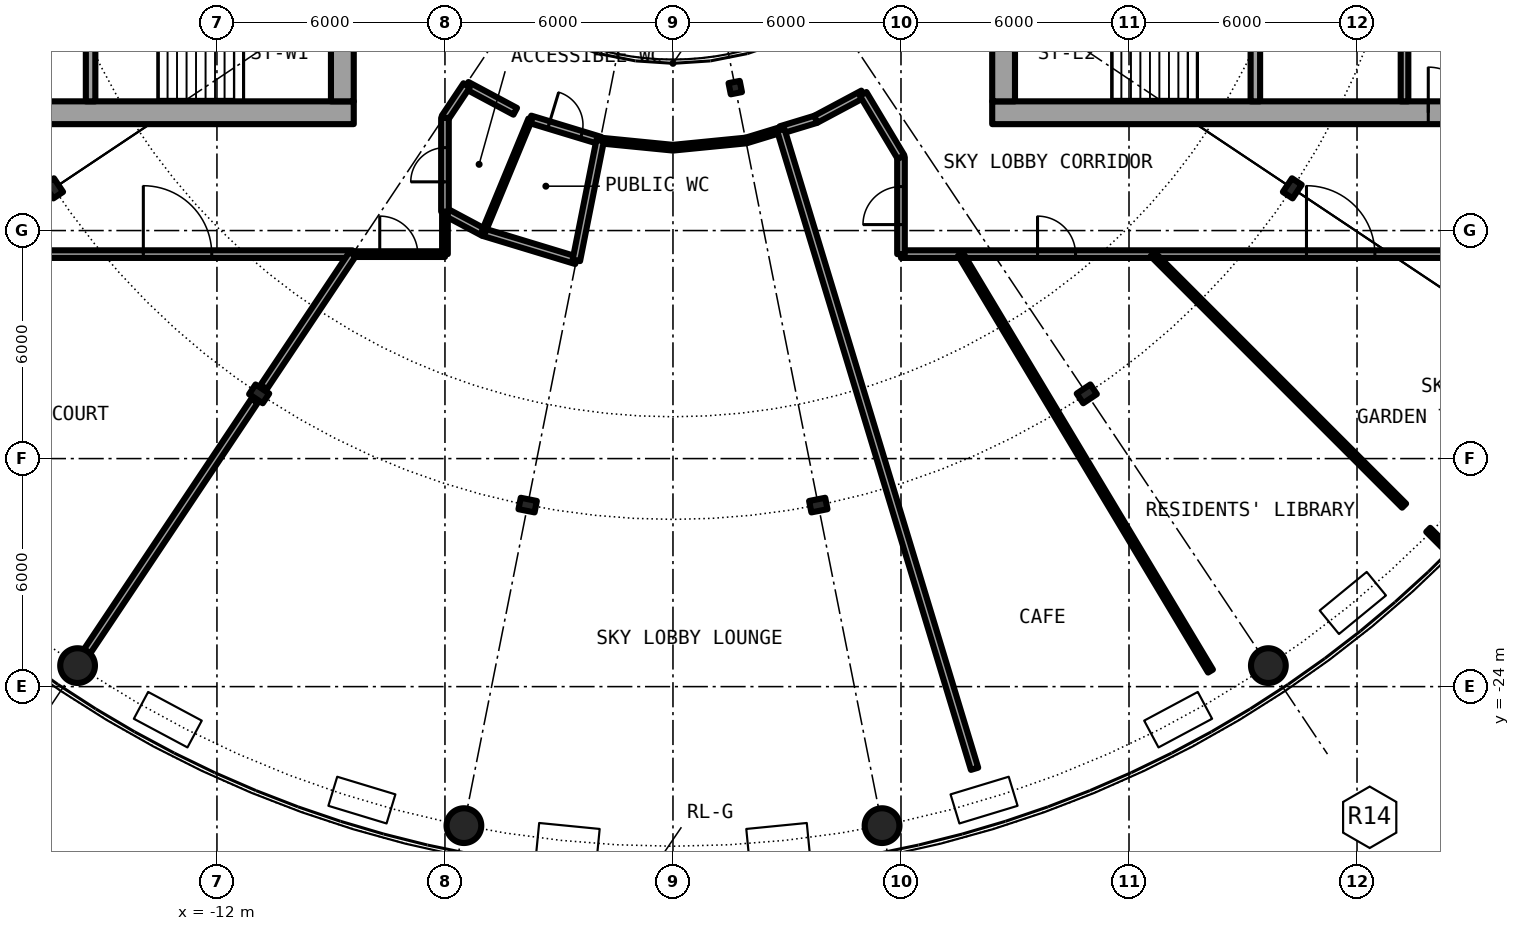
"""IFC4 building model, lengths in metres.
Left out: names, types, materials, properties, quantities, classifications, styles, units other than length and angle.
Written with IfcOpenShell. Run it as: python <this file> out.ifc"""

import sys

from ifc_helpers import new_model, si_unit, direction, frame, frame_2d, origin, origin_2d, place, context, subcontext, project, spatial, rectangle, hollow_circle, i_section, extrude, element, fill, save


model = new_model("IFC4")
c1 = context("Model", 3, precision=1e-05, world=origin(), true_north=direction((0.0, 1.0)))
c2 = subcontext(c1, "Body", "Model", "MODEL_VIEW")
j1 = project(units=[si_unit("LENGTHUNIT", "METRE"), si_unit("PLANEANGLEUNIT", "RADIAN")], contexts=[c1])
p1 = place(None, origin())
s1 = spatial("IfcSite", under=j1, at=p1, CompositionType="ELEMENT")
p2 = place(p1, origin())
s2 = spatial("IfcBuilding", under=s1, at=p2, CompositionType="ELEMENT")
p3 = place(p2, frame((0.0, 0.0, 139.1)))
s3 = spatial("IfcBuildingStorey", under=s2, at=p3, CompositionType="ELEMENT", Elevation=139.1)
for number, where, z_axis, x_axis in (
    (1, (-15.667, -23.448, 0.0), (0.0, 0.0, 1.0), (1.0, 0.0, 0.0)),
    (2, (-5.501, -27.658, 0.0), (0.0, 0.0, 1.0), (1.0, 0.0, 0.0)),
    (3, (5.501, -27.658, 0.0), (0.0, 0.0, 1.0), (1.0, 0.0, 0.0)),
    (4, (15.667, -23.448, 0.0), (0.0, 0.0, 1.0), (1.0, 0.0, 0.0)),
):
    element("IfcColumn", number, at=place(p3, frame(where, z_axis=z_axis, x_axis=x_axis)), inside=s3, PredefinedType="COLUMN", context=c2, shape_type="SweptSolid", body=[
        extrude(hollow_circle(Radius=0.457, WallThickness=0.04, at=origin_2d()), origin(), (0.0, 0.0, 1.0), 6.1),
    ])
for number, where, z_axis, x_axis in (
    (5, (-16.297, -10.889, 0.0), (0.0, 0.0, 1.0), (-0.831, -0.556, 0.0)),
    (6, (-10.889, -16.297, 0.0), (0.0, 0.0, 1.0), (-0.556, -0.831, 0.0)),
    (7, (-3.824, -19.223, 0.0), (0.0, 0.0, 1.0), (-0.195, -0.981, 0.0)),
    (8, (3.824, -19.223, 0.0), (0.0, 0.0, 1.0), (0.195, -0.981, 0.0)),
    (9, (10.889, -16.297, 0.0), (0.0, 0.0, 1.0), (0.556, -0.831, 0.0)),
    (10, (16.297, -10.889, 0.0), (0.0, 0.0, 1.0), (0.831, -0.556, 0.0)),
):
    element("IfcColumn", number, at=place(p3, frame(where, z_axis=z_axis, x_axis=x_axis)), inside=s3, PredefinedType="COLUMN", context=c2, shape_type="SweptSolid", body=[
        extrude(i_section(OverallWidth=0.307, OverallDepth=0.432, WebThickness=0.021, FlangeThickness=0.04, FilletRadius=0.027, at=origin_2d()), origin(), (0.0, 0.0, 1.0), 6.1),
    ])
p4 = place(p3, frame((1.639, -8.239, 0.0), z_axis=(0.0, 0.0, 1.0), x_axis=(0.195090322016, -0.980785280403, 0.0)))
e11 = element("IfcColumn", 11, at=p4, inside=s3, PredefinedType="COLUMN", context=c2, shape_type="SweptSolid", body=[
    extrude(i_section(OverallWidth=0.3, OverallDepth=0.3, WebThickness=0.011, FlangeThickness=0.019, FilletRadius=0.027, at=origin_2d()), origin(), (0.0, 0.0, 1.0), 6.1),
])
p5 = place(p3, frame((8.4, -8.9, 0.0), z_axis=(0.0, 0.0, 1.0), x_axis=(1.0, 0.0, 0.0)))
e12 = element("IfcWall", 12, at=p5, inside=s3, PredefinedType="SHEAR", context=c2, shape_type="SweptSolid", body=[
    extrude(rectangle(XDim=13.8, YDim=0.6, at=frame_2d((6.9, 0.0))), origin(), (0.0, 0.0, 1.0), 6.1),
])
p6 = place(p5, frame((11.475, 0.0, 0.0)))
e13 = element("IfcOpeningElement", 13, at=p6, cuts=e12, PredefinedType="OPENING", context=c2, shape_type="SweptSolid", body=[
    extrude(rectangle(XDim=1.2, YDim=2.3, at=frame_2d((0.6, 1.15))), frame((0.0, 0.31, 0.0), z_axis=(0.0, -1.0, 0.0), x_axis=(1.0, 0.0, 0.0)), (0.0, 0.0, 1.0), 0.62),
])
p7 = place(p3, frame((8.7, -8.6, 0.0), z_axis=(0.0, 0.0, 1.0), x_axis=(0.0, 1.0, 0.0)))
e14 = element("IfcWall", 14, at=p7, inside=s3, PredefinedType="SHEAR", context=c2, shape_type="SweptSolid", body=[
    extrude(rectangle(XDim=17.2, YDim=0.6, at=frame_2d((8.6, 0.0))), origin(), (0.0, 0.0, 1.0), 6.1),
])
p8 = place(p7, frame((7.4, 0.0, 0.1)))
e15 = element("IfcOpeningElement", 15, at=p8, cuts=e14, PredefinedType="OPENING", context=c2, shape_type="SweptSolid", body=[
    extrude(rectangle(XDim=2.4, YDim=2.2, at=frame_2d((1.2, 1.1))), frame((0.0, 0.31, 0.0), z_axis=(0.0, -1.0, 0.0), x_axis=(1.0, 0.0, 0.0)), (0.0, 0.0, 1.0), 0.62),
])
p9 = place(p3, frame((15.325, -8.6, 0.0), z_axis=(0.0, 0.0, 1.0), x_axis=(0.0, 1.0, 0.0)))
e16 = element("IfcWall", 16, at=p9, inside=s3, PredefinedType="SHEAR", context=c2, shape_type="SweptSolid", body=[
    extrude(rectangle(XDim=3.95, YDim=0.25, at=frame_2d((1.975, 0.0))), origin(), (0.0, 0.0, 1.0), 6.1),
])
p10 = place(p9, frame((2.025, 0.0, 0.0)))
e17 = element("IfcOpeningElement", 17, at=p10, cuts=e16, PredefinedType="OPENING", context=c2, shape_type="SweptSolid", body=[
    extrude(rectangle(XDim=1.2, YDim=2.3, at=frame_2d((0.6, 1.15))), frame((0.0, 0.135, 0.0), z_axis=(0.0, -1.0, 0.0), x_axis=(1.0, 0.0, 0.0)), (0.0, 0.0, 1.0), 0.27),
])
p11 = place(p3, frame((19.25, -8.6, 0.0), z_axis=(0.0, 0.0, 1.0), x_axis=(0.0, 1.0, 0.0)))
e18 = element("IfcWall", 18, at=p11, inside=s3, PredefinedType="SOLIDWALL", context=c2, shape_type="SweptSolid", body=[
    extrude(rectangle(XDim=7.025, YDim=0.2, at=frame_2d((3.513, 0.0))), origin(), (0.0, 0.0, 1.0), 5.75),
])
p12 = place(p11, frame((2.35, 0.0, 0.0)))
e19 = element("IfcOpeningElement", 19, at=p12, cuts=e18, PredefinedType="OPENING", context=c2, shape_type="SweptSolid", body=[
    extrude(rectangle(XDim=1.1, YDim=2.3, at=frame_2d((0.55, 1.15))), frame((0.0, 0.11, 0.0), z_axis=(0.0, -1.0, 0.0), x_axis=(1.0, 0.0, 0.0)), (0.0, 0.0, 1.0), 0.22),
])
p13 = place(p3, frame((-22.2, -8.9, 0.0), z_axis=(0.0, 0.0, 1.0), x_axis=(1.0, 0.0, 0.0)))
e20 = element("IfcWall", 20, at=p13, inside=s3, PredefinedType="SHEAR", context=c2, shape_type="SweptSolid", body=[
    extrude(rectangle(XDim=13.8, YDim=0.6, at=frame_2d((6.9, 0.0))), origin(), (0.0, 0.0, 1.0), 6.1),
])
p14 = place(p13, frame((1.125, 0.0, 0.0)))
e21 = element("IfcOpeningElement", 21, at=p14, cuts=e20, PredefinedType="OPENING", context=c2, shape_type="SweptSolid", body=[
    extrude(rectangle(XDim=1.2, YDim=2.3, at=frame_2d((0.6, 1.15))), frame((0.0, 0.31, 0.0), z_axis=(0.0, -1.0, 0.0), x_axis=(1.0, 0.0, 0.0)), (0.0, 0.0, 1.0), 0.62),
])
p15 = place(p3, frame((-8.7, 8.6, 0.0), z_axis=(0.0, 0.0, 1.0), x_axis=(0.0, -1.0, 0.0)))
e22 = element("IfcWall", 22, at=p15, inside=s3, PredefinedType="SHEAR", context=c2, shape_type="SweptSolid", body=[
    extrude(rectangle(XDim=17.2, YDim=0.6, at=frame_2d((8.6, 0.0))), origin(), (0.0, 0.0, 1.0), 6.1),
])
p16 = place(p15, frame((7.4, 0.0, 0.1)))
e23 = element("IfcOpeningElement", 23, at=p16, cuts=e22, PredefinedType="OPENING", context=c2, shape_type="SweptSolid", body=[
    extrude(rectangle(XDim=2.4, YDim=2.2, at=frame_2d((1.2, 1.1))), frame((0.0, 0.31, 0.0), z_axis=(0.0, -1.0, 0.0), x_axis=(1.0, 0.0, 0.0)), (0.0, 0.0, 1.0), 0.62),
])
p17 = place(p3, frame((-15.325, -4.65, 0.0), z_axis=(0.0, 0.0, 1.0), x_axis=(0.0, -1.0, 0.0)))
e24 = element("IfcWall", 24, at=p17, inside=s3, PredefinedType="SHEAR", context=c2, shape_type="SweptSolid", body=[
    extrude(rectangle(XDim=3.95, YDim=0.25, at=frame_2d((1.975, 0.0))), origin(), (0.0, 0.0, 1.0), 6.1),
])
p18 = place(p17, frame((1.375, 0.0, 0.0)))
e25 = element("IfcOpeningElement", 25, at=p18, cuts=e24, PredefinedType="OPENING", context=c2, shape_type="SweptSolid", body=[
    extrude(rectangle(XDim=1.2, YDim=2.3, at=frame_2d((0.6, 1.15))), frame((0.0, 0.135, 0.0), z_axis=(0.0, -1.0, 0.0), x_axis=(1.0, 0.0, 0.0)), (0.0, 0.0, 1.0), 0.27),
])
p19 = place(p3, frame((-6.0, -11.503, 0.0), z_axis=(0.0, 0.0, 1.0), x_axis=(0.882235076446, -0.470809165042, 0.0)))
e26 = element("IfcWall", 26, at=p19, inside=s3, PredefinedType="PARTITIONING", context=c2, shape_type="SweptSolid", body=[
    extrude(rectangle(XDim=1.147, YDim=0.2, at=frame_2d((0.573, 0.0))), origin(), (0.0, 0.0, 1.0), 5.75),
])
p20 = place(p3, frame((-4.988, -12.043, 0.0), z_axis=(0.0, 0.0, 1.0), x_axis=(0.956914242202, -0.290370682182, 0.0)))
e27 = element("IfcWall", 27, at=p20, inside=s3, PredefinedType="PARTITIONING", context=c2, shape_type="SweptSolid", body=[
    extrude(rectangle(XDim=2.555, YDim=0.2, at=frame_2d((1.278, 0.0))), origin(), (0.0, 0.0, 1.0), 5.75),
])
p21 = place(p3, frame((-21.9, -12.62, 0.0), z_axis=(0.0, 0.0, 1.0), x_axis=(1.0, 0.0, 0.0)))
e28 = element("IfcWall", 28, at=p21, inside=s3, PredefinedType="PARTITIONING", context=c2, shape_type="SweptSolid", body=[
    extrude(rectangle(XDim=13.468, YDim=0.2, at=frame_2d((6.734, 0.0))), origin(), (0.0, 0.0, 1.0), 5.75),
])
p22 = place(p21, frame((7.963, 0.0, 0.0)))
e29 = element("IfcOpeningElement", 29, at=p22, cuts=e28, PredefinedType="OPENING", context=c2, shape_type="SweptSolid", body=[
    extrude(rectangle(XDim=1.8, YDim=2.3, at=frame_2d((0.9, 1.15))), frame((0.0, 0.11, 0.0), z_axis=(0.0, -1.0, 0.0), x_axis=(1.0, 0.0, 0.0)), (0.0, 0.0, 1.0), 0.22),
])
p23 = place(p3, frame((-8.432, -12.62, 0.0), z_axis=(0.0, 0.0, 1.0), x_axis=(1.0, 0.0, 0.0)))
e30 = element("IfcWall", 30, at=p23, inside=s3, PredefinedType="PARTITIONING", context=c2, shape_type="SweptSolid", body=[
    extrude(rectangle(XDim=2.432, YDim=0.15, at=frame_2d((1.216, 0.0))), origin(), (0.0, 0.0, 1.0), 5.75),
])
p24 = place(p23, frame((0.716, 0.0, 0.0)))
e31 = element("IfcOpeningElement", 31, at=p24, cuts=e30, PredefinedType="OPENING", context=c2, shape_type="SweptSolid", body=[
    extrude(rectangle(XDim=1.0, YDim=2.3, at=frame_2d((0.5, 1.15))), frame((0.0, 0.085, 0.0), z_axis=(0.0, -1.0, 0.0), x_axis=(1.0, 0.0, 0.0)), (0.0, 0.0, 1.0), 0.17),
])
p25 = place(p3, frame((6.0, -12.62, 0.0), z_axis=(0.0, 0.0, 1.0), x_axis=(1.0, 0.0, 0.0)))
e32 = element("IfcWall", 32, at=p25, inside=s3, PredefinedType="PARTITIONING", context=c2, shape_type="SweptSolid", body=[
    extrude(rectangle(XDim=15.9, YDim=0.2, at=frame_2d((7.95, 0.0))), origin(), (0.0, 0.0, 1.0), 5.75),
])
p26 = place(p25, frame((3.593, 0.0, 0.0)))
e33 = element("IfcOpeningElement", 33, at=p26, cuts=e32, PredefinedType="OPENING", context=c2, shape_type="SweptSolid", body=[
    extrude(rectangle(XDim=1.0, YDim=2.3, at=frame_2d((0.5, 1.15))), frame((0.0, 0.11, 0.0), z_axis=(0.0, -1.0, 0.0), x_axis=(1.0, 0.0, 0.0)), (0.0, 0.0, 1.0), 0.22),
])
p27 = place(p25, frame((10.67, 0.0, 0.0)))
e34 = element("IfcOpeningElement", 34, at=p27, cuts=e32, PredefinedType="OPENING", context=c2, shape_type="SweptSolid", body=[
    extrude(rectangle(XDim=1.8, YDim=2.3, at=frame_2d((0.9, 1.15))), frame((0.0, 0.11, 0.0), z_axis=(0.0, -1.0, 0.0), x_axis=(1.0, 0.0, 0.0)), (0.0, 0.0, 1.0), 0.22),
])
p28 = place(p3, frame((-5.429, -8.179, 0.0), z_axis=(0.0, 0.0, 1.0), x_axis=(0.881652665802, -0.471898905364, 0.0)))
e35 = element("IfcWall", 35, at=p28, inside=s3, PredefinedType="PARTITIONING", context=c2, shape_type="SweptSolid", body=[
    extrude(rectangle(XDim=1.45, YDim=0.2, at=frame_2d((0.725, 0.0))), origin(), (0.0, 0.0, 1.0), 5.75),
])
p29 = place(p3, frame((-3.758, -9.072, 0.0), z_axis=(0.0, 0.0, 1.0), x_axis=(0.956896312675, -0.29042976223, 0.0)))
e36 = element("IfcWall", 36, at=p29, inside=s3, PredefinedType="PARTITIONING", context=c2, shape_type="SweptSolid", body=[
    extrude(rectangle(XDim=1.925, YDim=0.2, at=frame_2d((0.962, 0.0))), origin(), (0.0, 0.0, 1.0), 5.75),
])
p30 = place(p29, frame((0.512, 0.0, 0.0)))
e37 = element("IfcOpeningElement", 37, at=p30, cuts=e36, PredefinedType="OPENING", context=c2, shape_type="SweptSolid", body=[
    extrude(rectangle(XDim=0.9, YDim=2.3, at=frame_2d((0.45, 1.15))), frame((0.0, 0.11, 0.0), z_axis=(0.0, -1.0, 0.0), x_axis=(1.0, 0.0, 0.0)), (0.0, 0.0, 1.0), 0.22),
])
for number, where, z_axis, x_axis in (
    (38, (-1.916, -9.631, 0.0), (0.0, 0.0, 1.0), (0.995, -0.098, 0.0)),
    (39, (0.0, -9.82, 0.0), (0.0, 0.0, 1.0), (0.995, 0.098, 0.0)),
):
    element("IfcWall", number, at=place(p3, frame(where, z_axis=z_axis, x_axis=x_axis)), inside=s3, PredefinedType="PARTITIONING", context=c2, shape_type="SweptSolid", body=[
        extrude(rectangle(XDim=1.925, YDim=0.15, at=frame_2d((0.963, 0.0))), origin(), (0.0, 0.0, 1.0), 5.75),
    ])
p31 = place(p3, frame((1.921, -9.631, 0.0), z_axis=(0.0, 0.0, 1.0), x_axis=(0.956545376911, 0.29158350761, 0.0)))
e40 = element("IfcWall", 40, at=p31, inside=s3, PredefinedType="PARTITIONING", context=c2, shape_type="SweptSolid", body=[
    extrude(rectangle(XDim=0.967, YDim=0.15, at=frame_2d((0.483, 0.0))), origin(), (0.0, 0.0, 1.0), 5.75),
])
p32 = place(p3, frame((2.837, -9.352, 0.0), z_axis=(0.0, 0.0, 1.0), x_axis=(0.956911876356, 0.290378478694, 0.0)))
e41 = element("IfcWall", 41, at=p32, inside=s3, PredefinedType="PARTITIONING", context=c2, shape_type="SweptSolid", body=[
    extrude(rectangle(XDim=0.968, YDim=0.2, at=frame_2d((0.484, 0.0))), origin(), (0.0, 0.0, 1.0), 5.75),
])
p33 = place(p3, frame((3.758, -9.072, 0.0), z_axis=(0.0, 0.0, 1.0), x_axis=(0.88204677125, 0.471161854703, 0.0)))
e42 = element("IfcWall", 42, at=p33, inside=s3, PredefinedType="PARTITIONING", context=c2, shape_type="SweptSolid", body=[
    extrude(rectangle(XDim=1.414, YDim=0.2, at=frame_2d((0.707, 0.0))), origin(), (0.0, 0.0, 1.0), 5.75),
])
p34 = place(p3, frame((6.0, -12.62, 0.0), z_axis=(0.0, 0.0, 1.0), x_axis=(0.0, 1.0, 0.0)))
e43 = element("IfcWall", 43, at=p34, inside=s3, PredefinedType="PARTITIONING", context=c2, shape_type="SweptSolid", body=[
    extrude(rectangle(XDim=2.554, YDim=0.2, at=frame_2d((1.277, 0.0))), origin(), (0.0, 0.0, 1.0), 5.75),
])
p35 = place(p34, frame((0.777, 0.0, 0.0)))
e44 = element("IfcOpeningElement", 44, at=p35, cuts=e43, PredefinedType="OPENING", context=c2, shape_type="SweptSolid", body=[
    extrude(rectangle(XDim=1.0, YDim=2.3, at=frame_2d((0.5, 1.15))), frame((0.0, 0.11, 0.0), z_axis=(0.0, -1.0, 0.0), x_axis=(1.0, 0.0, 0.0)), (0.0, 0.0, 1.0), 0.22),
])
p36 = place(p3, frame((-6.0, -9.034, 0.0), z_axis=(0.0, 0.0, 1.0), x_axis=(0.555412364489, 0.831575075007, 0.0)))
e45 = element("IfcWall", 45, at=p36, inside=s3, PredefinedType="PARTITIONING", context=c2, shape_type="SweptSolid", body=[
    extrude(rectangle(XDim=1.028, YDim=0.2, at=frame_2d((0.514, 0.0))), origin(), (0.0, 0.0, 1.0), 5.75),
])
p37 = place(p3, frame((5.005, -8.406, 0.0), z_axis=(0.0, 0.0, 1.0), x_axis=(0.514180349955, -0.857682090124, 0.0)))
e46 = element("IfcWall", 46, at=p37, inside=s3, PredefinedType="PARTITIONING", context=c2, shape_type="SweptSolid", body=[
    extrude(rectangle(XDim=1.935, YDim=0.2, at=frame_2d((0.968, 0.0))), origin(), (0.0, 0.0, 1.0), 5.75),
])
p38 = place(p3, frame((-15.418, -23.075, 0.0), z_axis=(0.0, 0.0, 1.0), x_axis=(0.555601548305, 0.831448687245, 0.0)))
e47 = element("IfcWall", 47, at=p38, inside=s3, PredefinedType="PARTITIONING", context=c2, shape_type="SweptSolid", body=[
    extrude(rectangle(XDim=7.936, YDim=0.2, at=frame_2d((3.968, 0.0))), origin(), (0.0, 0.0, 1.0), 5.75),
])
p39 = place(p3, frame((-10.769, -16.117, 0.0), z_axis=(0.0, 0.0, 1.0), x_axis=(0.555677670829, 0.831397814612, 0.0)))
e48 = element("IfcWall", 48, at=p39, inside=s3, PredefinedType="PARTITIONING", context=c2, shape_type="SweptSolid", body=[
    extrude(rectangle(XDim=4.206, YDim=0.2, at=frame_2d((2.103, 0.0))), origin(), (0.0, 0.0, 1.0), 5.75),
])
p40 = place(p3, frame((-4.988, -12.043, 0.0), z_axis=(0.0, 0.0, 1.0), x_axis=(0.382517205945, 0.923948368231, 0.0)))
e49 = element("IfcWall", 49, at=p40, inside=s3, PredefinedType="PARTITIONING", context=c2, shape_type="SweptSolid", body=[
    extrude(rectangle(XDim=3.216, YDim=0.1, at=frame_2d((1.608, 0.0))), origin(), (0.0, 0.0, 1.0), 5.75),
])
p41 = place(p3, frame((-2.543, -12.785, 0.0), z_axis=(0.0, 0.0, 1.0), x_axis=(0.194977117829, 0.980807791325, 0.0)))
e50 = element("IfcWall", 50, at=p41, inside=s3, PredefinedType="PARTITIONING", context=c2, shape_type="SweptSolid", body=[
    extrude(rectangle(XDim=3.216, YDim=0.2, at=frame_2d((1.608, 0.0))), origin(), (0.0, 0.0, 1.0), 5.75),
])
p42 = place(p3, frame((2.837, -9.352, 0.0), z_axis=(0.0, 0.0, 1.0), x_axis=(0.290276626732, -0.956942777794, 0.0)))
e51 = element("IfcWall", 51, at=p42, inside=s3, PredefinedType="PARTITIONING", context=c2, shape_type="SweptSolid", body=[
    extrude(rectangle(XDim=17.566, YDim=0.2, at=frame_2d((8.783, 0.0))), origin(), (0.0, 0.0, 1.0), 5.75),
])
p43 = place(p3, frame((7.566, -12.62, 0.0), z_axis=(0.0, 0.0, 1.0), x_axis=(0.514240323404, -0.857646133195, 0.0)))
e52 = element("IfcWall", 52, at=p43, inside=s3, PredefinedType="PARTITIONING", context=c2, shape_type="SweptSolid", body=[
    extrude(rectangle(XDim=12.792, YDim=0.15, at=frame_2d((6.396, 0.0))), origin(), (0.0, 0.0, 1.0), 5.75),
])
p44 = place(p3, frame((12.62, -12.62, 0.0), z_axis=(0.0, 0.0, 1.0), x_axis=(0.707106781187, -0.707106781187, 0.0)))
e53 = element("IfcWall", 53, at=p44, inside=s3, PredefinedType="PARTITIONING", context=c2, shape_type="SweptSolid", body=[
    extrude(rectangle(XDim=9.361, YDim=0.15, at=frame_2d((4.68, 0.0))), origin(), (0.0, 0.0, 1.0), 5.75),
])
p45 = place(p3, frame((19.875, -19.875, 0.0), z_axis=(0.0, 0.0, 1.0), x_axis=(0.707106781187, -0.707106781187, 0.0)))
e54 = element("IfcWall", 54, at=p45, inside=s3, PredefinedType="PARTITIONING", context=c2, shape_type="SweptSolid", body=[
    extrude(rectangle(XDim=0.693, YDim=0.15, at=frame_2d((0.346, 0.0))), origin(), (0.0, 0.0, 1.0), 5.75),
])
p46 = place(p3, frame((-6.0, -12.62, 0.0), z_axis=(0.0, 0.0, 1.0), x_axis=(0.0, 1.0, 0.0)))
e55 = element("IfcWall", 55, at=p46, inside=s3, PredefinedType="PARTITIONING", context=c2, shape_type="SweptSolid", body=[
    extrude(rectangle(XDim=1.117, YDim=0.15, at=frame_2d((0.559, 0.0))), origin(), (0.0, 0.0, 1.0), 5.75),
])
p47 = place(p3, frame((-6.0, -11.503, 0.0), z_axis=(0.0, 0.0, 1.0), x_axis=(0.0, 1.0, 0.0)))
e56 = element("IfcWall", 56, at=p47, inside=s3, PredefinedType="PARTITIONING", context=c2, shape_type="SweptSolid", body=[
    extrude(rectangle(XDim=2.469, YDim=0.2, at=frame_2d((1.234, 0.0))), origin(), (0.0, 0.0, 1.0), 5.75),
])
p48 = place(p47, frame((0.785, 0.0, 0.0)))
e57 = element("IfcOpeningElement", 57, at=p48, cuts=e56, PredefinedType="OPENING", context=c2, shape_type="SweptSolid", body=[
    extrude(rectangle(XDim=0.9, YDim=2.3, at=frame_2d((0.45, 1.15))), frame((0.0, 0.11, 0.0), z_axis=(0.0, -1.0, 0.0), x_axis=(1.0, 0.0, 0.0)), (0.0, 0.0, 1.0), 0.22),
])
p49 = place(p6, origin())
e58 = element("IfcDoor", 58, at=p49, inside=s3, OperationType="SINGLE_SWING_LEFT", PredefinedType="DOOR", context=c2, shape_type="SweptSolid", body=[
    extrude(rectangle(XDim=1.2, YDim=2.3, at=frame_2d((0.6, 1.15))), frame((0.0, 0.025, 0.0), z_axis=(0.0, -1.0, 0.0), x_axis=(1.0, 0.0, 0.0)), (0.0, 0.0, 1.0), 0.05),
])
fill(e13, e58)
p50 = place(p48, origin())
e59 = element("IfcDoor", 59, at=p50, inside=s3, OperationType="SINGLE_SWING_RIGHT", PredefinedType="DOOR", context=c2, shape_type="SweptSolid", body=[
    extrude(rectangle(XDim=0.9, YDim=2.3, at=frame_2d((0.45, 1.15))), frame((0.0, 0.025, 0.0), z_axis=(0.0, -1.0, 0.0), x_axis=(1.0, 0.0, 0.0)), (0.0, 0.0, 1.0), 0.05),
])
fill(e57, e59)
p51 = place(p30, origin())
e60 = element("IfcDoor", 60, at=p51, inside=s3, OperationType="SINGLE_SWING_RIGHT", PredefinedType="DOOR", context=c2, shape_type="SweptSolid", body=[
    extrude(rectangle(XDim=0.9, YDim=2.3, at=frame_2d((0.45, 1.15))), frame((0.0, 0.025, 0.0), z_axis=(0.0, -1.0, 0.0), x_axis=(1.0, 0.0, 0.0)), (0.0, 0.0, 1.0), 0.05),
])
fill(e37, e60)
p52 = place(p24, origin())
e61 = element("IfcDoor", 61, at=p52, inside=s3, OperationType="SINGLE_SWING_LEFT", PredefinedType="DOOR", context=c2, shape_type="SweptSolid", body=[
    extrude(rectangle(XDim=1.0, YDim=2.3, at=frame_2d((0.5, 1.15))), frame((0.0, 0.025, 0.0), z_axis=(0.0, -1.0, 0.0), x_axis=(1.0, 0.0, 0.0)), (0.0, 0.0, 1.0), 0.05),
])
fill(e31, e61)
p53 = place(p35, origin())
e62 = element("IfcDoor", 62, at=p53, inside=s3, OperationType="SINGLE_SWING_LEFT", PredefinedType="DOOR", context=c2, shape_type="SweptSolid", body=[
    extrude(rectangle(XDim=1.0, YDim=2.3, at=frame_2d((0.5, 1.15))), frame((0.0, 0.025, 0.0), z_axis=(0.0, -1.0, 0.0), x_axis=(1.0, 0.0, 0.0)), (0.0, 0.0, 1.0), 0.05),
])
fill(e44, e62)
p54 = place(p26, origin())
e63 = element("IfcDoor", 63, at=p54, inside=s3, OperationType="SINGLE_SWING_LEFT", PredefinedType="DOOR", context=c2, shape_type="SweptSolid", body=[
    extrude(rectangle(XDim=1.0, YDim=2.3, at=frame_2d((0.5, 1.15))), frame((0.0, 0.025, 0.0), z_axis=(0.0, -1.0, 0.0), x_axis=(1.0, 0.0, 0.0)), (0.0, 0.0, 1.0), 0.05),
])
fill(e33, e63)
p55 = place(p22, origin())
e64 = element("IfcDoor", 64, at=p55, inside=s3, OperationType="DOUBLE_DOOR_SINGLE_SWING", PredefinedType="DOOR", context=c2, shape_type="SweptSolid", body=[
    extrude(rectangle(XDim=1.8, YDim=2.3, at=frame_2d((0.9, 1.15))), frame((0.0, 0.025, 0.0), z_axis=(0.0, -1.0, 0.0), x_axis=(1.0, 0.0, 0.0)), (0.0, 0.0, 1.0), 0.05),
])
fill(e29, e64)
p56 = place(p27, origin())
e65 = element("IfcDoor", 65, at=p56, inside=s3, OperationType="DOUBLE_DOOR_SINGLE_SWING", PredefinedType="DOOR", context=c2, shape_type="SweptSolid", body=[
    extrude(rectangle(XDim=1.8, YDim=2.3, at=frame_2d((0.9, 1.15))), frame((0.0, 0.025, 0.0), z_axis=(0.0, -1.0, 0.0), x_axis=(1.0, 0.0, 0.0)), (0.0, 0.0, 1.0), 0.05),
])
fill(e34, e65)
save(model, sys.argv[1])
